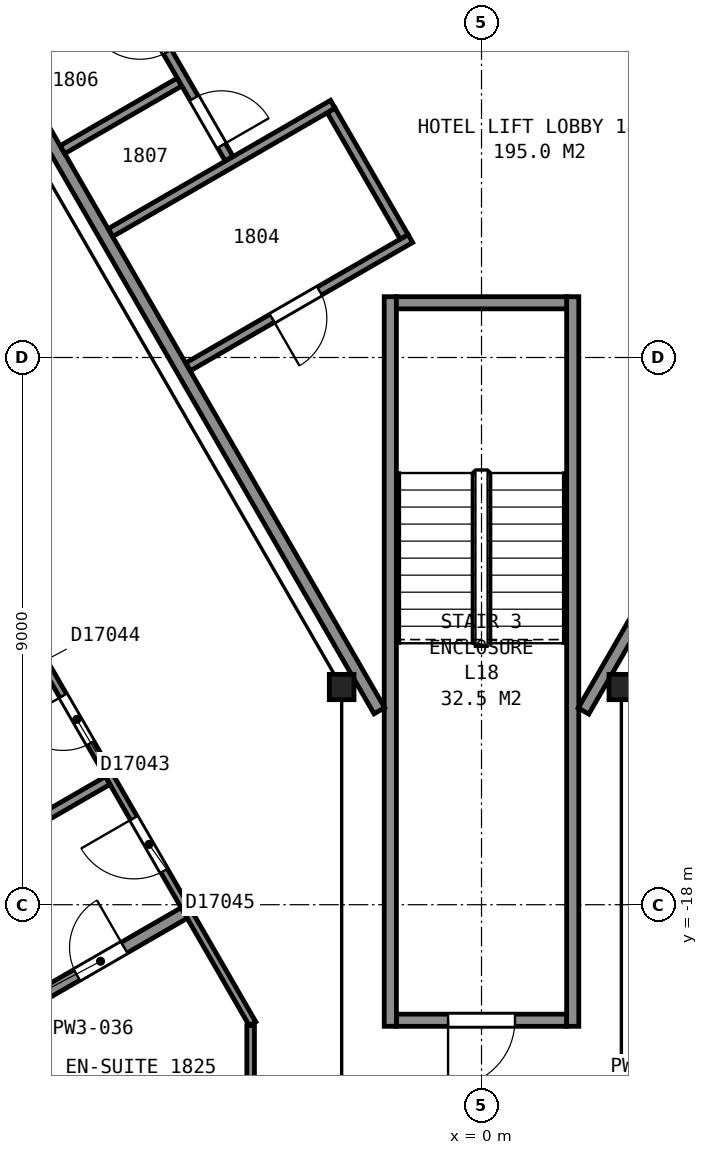
"""IFC4 building model, lengths in metres.
Left out: names, types, materials, properties, quantities, classifications, styles, units other than length and angle.
Written with IfcOpenShell. Run it as: python <this file> out.ifc"""

import sys

from ifc_helpers import new_model, si_unit, direction, frame, frame_2d, origin, origin_2d, place, context, subcontext, project, spatial, rectangle, i_section, extrude, element, fill, save


model = new_model("IFC4")
c1 = context("Model", 3, precision=1e-05, world=origin(), true_north=direction((0.0, 1.0)))
c2 = subcontext(c1, "Body", "Model", "MODEL_VIEW")
j1 = project(units=[si_unit("LENGTHUNIT", "METRE"), si_unit("PLANEANGLEUNIT", "RADIAN")], contexts=[c1])
p1 = place(None, origin())
s1 = spatial("IfcSite", under=j1, at=p1, CompositionType="ELEMENT")
p2 = place(p1, origin())
s2 = spatial("IfcBuilding", under=s1, at=p2, CompositionType="ELEMENT")
p3 = place(p2, frame((0.0, 0.0, 80.0)))
s3 = spatial("IfcBuildingStorey", under=s2, at=p3, CompositionType="ELEMENT", Elevation=80.0)
for number, where, z_axis, x_axis in (
    (1, (-2.3, -14.42, 0.0), (0.0, 0.0, 1.0), (1.0, 0.0, 0.0)),
    (2, (2.3, -14.42, 0.0), (0.0, 0.0, 1.0), (1.0, 0.0, 0.0)),
):
    element("IfcColumn", number, at=place(p3, frame(where, z_axis=z_axis, x_axis=x_axis)), inside=s3, PredefinedType="COLUMN", context=c2, shape_type="SweptSolid", body=[
        extrude(i_section(OverallWidth=0.406, OverallDepth=0.417, WebThickness=0.03, FlangeThickness=0.048, FilletRadius=0.015, at=origin_2d()), origin(), (0.0, 0.0, 1.0), 3.6),
    ])
p4 = place(p3, frame((-1.4, -19.9, 0.0), z_axis=(0.0, 0.0, 1.0), x_axis=(1.0, 0.0, 0.0)))
e3 = element("IfcWall", 3, at=p4, inside=s3, PredefinedType="PARTITIONING", context=c2, shape_type="SweptSolid", body=[
    extrude(rectangle(XDim=2.8, YDim=0.2, at=frame_2d((1.4, 0.0))), origin(), (0.0, 0.0, 1.0), 3.35),
])
p5 = place(p4, frame((0.85, 0.0, 0.0)))
e4 = element("IfcOpeningElement", 4, at=p5, cuts=e3, PredefinedType="OPENING", context=c2, shape_type="SweptSolid", body=[
    extrude(rectangle(XDim=1.1, YDim=2.1, at=frame_2d((0.55, 1.05))), frame((0.0, 0.11, 0.0), z_axis=(0.0, -1.0, 0.0), x_axis=(1.0, 0.0, 0.0)), (0.0, 0.0, 1.0), 0.22),
])
for number, where, z_axis, x_axis in (
    (5, (1.5, -8.0, 0.0), (0.0, 0.0, 1.0), (0.0, -1.0, 0.0)),
    (6, (-1.5, -8.0, 0.0), (0.0, 0.0, 1.0), (0.0, -1.0, 0.0)),
):
    element("IfcWall", number, at=place(p3, frame(where, z_axis=z_axis, x_axis=x_axis)), inside=s3, PredefinedType="PARTITIONING", context=c2, shape_type="SweptSolid", body=[
        extrude(rectangle(XDim=12.0, YDim=0.2, at=frame_2d((6.0, 0.0))), origin(), (0.0, 0.0, 1.0), 3.35),
    ])
p6 = place(p3, frame((-1.4, -8.1, 0.0), z_axis=(0.0, 0.0, 1.0), x_axis=(1.0, 0.0, 0.0)))
e7 = element("IfcWall", 7, at=p6, inside=s3, PredefinedType="PARTITIONING", context=c2, shape_type="SweptSolid", body=[
    extrude(rectangle(XDim=2.8, YDim=0.2, at=frame_2d((1.4, 0.0))), origin(), (0.0, 0.0, 1.0), 3.35),
])
p7 = place(p3, frame((-13.664, 5.946, 0.0), z_axis=(0.0, 0.0, 1.0), x_axis=(0.499994327219, -0.866028678941, 0.0)))
e8 = element("IfcWall", 8, at=p7, inside=s3, PredefinedType="PARTITIONING", context=c2, shape_type="SweptSolid", body=[
    extrude(rectangle(XDim=23.968, YDim=0.2, at=frame_2d((11.984, 0.0))), origin(), (0.0, 0.0, 1.0), 3.35),
])
p8 = place(p3, frame((-7.856, -3.912, 0.0), z_axis=(0.0, 0.0, 1.0), x_axis=(0.865971748, 0.500092923031, 0.0)))
e9 = element("IfcWall", 9, at=p8, inside=s3, PredefinedType="PARTITIONING", context=c2, shape_type="SweptSolid", body=[
    extrude(rectangle(XDim=2.225, YDim=0.15, at=frame_2d((1.112, 0.0))), origin(), (0.0, 0.0, 1.0), 3.35),
])
p9 = place(p3, frame((-6.892, -5.582, 0.0), z_axis=(0.0, 0.0, 1.0), x_axis=(0.865944298464, 0.500140452231, 0.0)))
e10 = element("IfcWall", 10, at=p9, inside=s3, PredefinedType="PARTITIONING", context=c2, shape_type="SweptSolid", body=[
    extrude(rectangle(XDim=2.224, YDim=0.15, at=frame_2d((1.112, 0.0))), origin(), (0.0, 0.0, 1.0), 3.35),
])
p10 = place(p3, frame((-6.1, -6.946, 0.0), z_axis=(0.0, 0.0, 1.0), x_axis=(0.866038200431, 0.499977834903, 0.0)))
e11 = element("IfcWall", 11, at=p10, inside=s3, PredefinedType="PARTITIONING", context=c2, shape_type="SweptSolid", body=[
    extrude(rectangle(XDim=4.22, YDim=0.15, at=frame_2d((2.11, 0.0))), origin(), (0.0, 0.0, 1.0), 3.35),
])
p11 = place(p3, frame((-4.152, -5.729, 0.0), z_axis=(0.0, 0.0, 1.0), x_axis=(-0.500024287448, 0.866011380966, 0.0)))
e12 = element("IfcWall", 12, at=p11, inside=s3, PredefinedType="PARTITIONING", context=c2, shape_type="SweptSolid", body=[
    extrude(rectangle(XDim=3.501, YDim=0.15, at=frame_2d((1.75, 0.0))), origin(), (0.0, 0.0, 1.0), 3.35),
])
p12 = place(p11, frame((2.026, 0.0, 0.0)))
e13 = element("IfcOpeningElement", 13, at=p12, cuts=e12, PredefinedType="OPENING", context=c2, shape_type="SweptSolid", body=[
    extrude(rectangle(XDim=0.9, YDim=2.1, at=frame_2d((0.45, 1.05))), frame((0.0, 0.085, 0.0), z_axis=(0.0, -1.0, 0.0), x_axis=(1.0, 0.0, 0.0)), (0.0, 0.0, 1.0), 0.17),
])
p13 = place(p11, frame((0.248, 0.0, 0.0)))
e14 = element("IfcOpeningElement", 14, at=p13, cuts=e12, PredefinedType="OPENING", context=c2, shape_type="SweptSolid", body=[
    extrude(rectangle(XDim=0.9, YDim=2.1, at=frame_2d((0.45, 1.05))), frame((0.0, 0.085, 0.0), z_axis=(0.0, -1.0, 0.0), x_axis=(1.0, 0.0, 0.0)), (0.0, 0.0, 1.0), 0.17),
])
p14 = place(p3, frame((-4.825, -9.154, 0.0), z_axis=(0.0, 0.0, 1.0), x_axis=(0.866023738697, 0.500002884005, 0.0)))
e15 = element("IfcWall", 15, at=p14, inside=s3, PredefinedType="PARTITIONING", context=c2, shape_type="SweptSolid", body=[
    extrude(rectangle(XDim=4.22, YDim=0.15, at=frame_2d((2.11, 0.0))), origin(), (0.0, 0.0, 1.0), 3.35),
])
p15 = place(p14, frame((1.595, 0.0, 0.0)))
e16 = element("IfcOpeningElement", 16, at=p15, cuts=e15, PredefinedType="OPENING", context=c2, shape_type="SweptSolid", body=[
    extrude(rectangle(XDim=0.9, YDim=2.1, at=frame_2d((0.45, 1.05))), frame((0.0, 0.085, 0.0), z_axis=(0.0, -1.0, 0.0), x_axis=(1.0, 0.0, 0.0)), (0.0, 0.0, 1.0), 0.17),
])
p16 = place(p3, frame((-2.472, -4.938, 0.0), z_axis=(0.0, 0.0, 1.0), x_axis=(0.500045362686, -0.865999212041, 0.0)))
e17 = element("IfcWall", 17, at=p16, inside=s3, PredefinedType="PARTITIONING", context=c2, shape_type="SweptSolid", body=[
    extrude(rectangle(XDim=2.4, YDim=0.15, at=frame_2d((1.2, 0.0))), origin(), (0.0, 0.0, 1.0), 3.35),
])
p17 = place(p3, frame((1.677, -14.815, 0.0), z_axis=(0.0, 0.0, 1.0), x_axis=(0.49999445743, 0.866028603765, 0.0)))
e18 = element("IfcWall", 18, at=p17, inside=s3, PredefinedType="PARTITIONING", context=c2, shape_type="SweptSolid", body=[
    extrude(rectangle(XDim=5.905, YDim=0.2, at=frame_2d((2.952, 0.0))), origin(), (0.0, 0.0, 1.0), 3.35),
])
p18 = place(p17, frame((3.855, 0.0, 0.0)))
e19 = element("IfcOpeningElement", 19, at=p18, cuts=e18, PredefinedType="OPENING", context=c2, shape_type="SweptSolid", body=[
    extrude(rectangle(XDim=1.8, YDim=2.1, at=frame_2d((0.9, 1.05))), frame((0.0, 0.11, 0.0), z_axis=(0.0, -1.0, 0.0), x_axis=(1.0, 0.0, 0.0)), (0.0, 0.0, 1.0), 0.22),
])
p19 = place(p3, frame((-3.766, -19.958, 0.0), z_axis=(0.0, 0.0, 1.0), x_axis=(-0.50002170027, 0.866012874765, 0.0)))
e20 = element("IfcWall", 20, at=p19, inside=s3, PredefinedType="PARTITIONING", context=c2, shape_type="SweptSolid", body=[
    extrude(rectangle(XDim=31.379, YDim=0.125, at=frame_2d((15.69, 0.0))), origin(), (0.0, 0.0, 1.0), 2.613),
])
p20 = place(p19, frame((25.28, 0.0, 0.0)))
e21 = element("IfcOpeningElement", 21, at=p20, cuts=e20, PredefinedType="OPENING", context=c2, shape_type="SweptSolid", body=[
    extrude(rectangle(XDim=1.5, YDim=2.1, at=frame_2d((0.75, 1.05))), frame((0.0, 0.073, 0.0), z_axis=(0.0, -1.0, 0.0), x_axis=(1.0, 0.0, 0.0)), (0.0, 0.0, 1.0), 0.145),
])
p21 = place(p19, frame((21.124, 0.0, 0.0)))
e22 = element("IfcOpeningElement", 22, at=p21, cuts=e20, PredefinedType="OPENING", context=c2, shape_type="SweptSolid", body=[
    extrude(rectangle(XDim=0.9, YDim=2.1, at=frame_2d((0.45, 1.05))), frame((0.0, 0.073, 0.0), z_axis=(0.0, -1.0, 0.0), x_axis=(1.0, 0.0, 0.0)), (0.0, 0.0, 1.0), 0.145),
])
p22 = place(p19, frame((14.349, 0.0, 0.0)))
e23 = element("IfcOpeningElement", 23, at=p22, cuts=e20, PredefinedType="OPENING", context=c2, shape_type="SweptSolid", body=[
    extrude(rectangle(XDim=0.9, YDim=2.1, at=frame_2d((0.45, 1.05))), frame((0.0, 0.073, 0.0), z_axis=(0.0, -1.0, 0.0), x_axis=(1.0, 0.0, 0.0)), (0.0, 0.0, 1.0), 0.145),
])
p23 = place(p19, frame((11.804, 0.0, 0.0)))
e24 = element("IfcOpeningElement", 24, at=p23, cuts=e20, PredefinedType="OPENING", context=c2, shape_type="SweptSolid", body=[
    extrude(rectangle(XDim=0.9, YDim=2.1, at=frame_2d((0.45, 1.05))), frame((0.0, 0.073, 0.0), z_axis=(0.0, -1.0, 0.0), x_axis=(1.0, 0.0, 0.0)), (0.0, 0.0, 1.0), 0.145),
])
p24 = place(p19, frame((5.33, 0.0, 0.0)))
e25 = element("IfcOpeningElement", 25, at=p24, cuts=e20, PredefinedType="OPENING", context=c2, shape_type="SweptSolid", body=[
    extrude(rectangle(XDim=0.9, YDim=2.1, at=frame_2d((0.45, 1.05))), frame((0.0, 0.073, 0.0), z_axis=(0.0, -1.0, 0.0), x_axis=(1.0, 0.0, 0.0)), (0.0, 0.0, 1.0), 0.145),
])
p25 = place(p19, frame((2.906, 0.0, 0.0)))
e26 = element("IfcOpeningElement", 26, at=p25, cuts=e20, PredefinedType="OPENING", context=c2, shape_type="SweptSolid", body=[
    extrude(rectangle(XDim=1.0, YDim=2.1, at=frame_2d((0.5, 1.05))), frame((0.0, 0.073, 0.0), z_axis=(0.0, -1.0, 0.0), x_axis=(1.0, 0.0, 0.0)), (0.0, 0.0, 1.0), 0.145),
])
p26 = place(p3, frame((-13.069, -19.953, 0.0), z_axis=(0.0, 0.0, 1.0), x_axis=(0.866021771655, 0.500006290979, 0.0)))
e27 = element("IfcWall", 27, at=p26, inside=s3, PredefinedType="PARTITIONING", context=c2, shape_type="SweptSolid", body=[
    extrude(rectangle(XDim=7.992, YDim=0.15, at=frame_2d((3.996, 0.0))), origin(), (0.0, 0.0, 1.0), 2.613),
])
p27 = place(p3, frame((-7.668, -19.877, 0.0), z_axis=(0.0, 0.0, 1.0), x_axis=(0.204611748063, -0.978843211426, 0.0)))
e28 = element("IfcWall", 28, at=p27, inside=s3, PredefinedType="PARTITIONING", context=c2, shape_type="SweptSolid", body=[
    extrude(rectangle(XDim=2.921, YDim=0.2, at=frame_2d((1.46, 0.0))), origin(), (0.0, 0.0, 1.0), 2.613),
])
p28 = place(p3, frame((-4.89, -18.136, 0.0), z_axis=(0.0, 0.0, 1.0), x_axis=(-0.866033317326, -0.499986293093, 0.0)))
e29 = element("IfcWall", 29, at=p28, inside=s3, PredefinedType="PARTITIONING", context=c2, shape_type="SweptSolid", body=[
    extrude(rectangle(XDim=3.337, YDim=0.2, at=frame_2d((1.669, 0.0))), origin(), (0.0, 0.0, 1.0), 2.613),
])
p29 = place(p28, frame((1.138, 0.0, 0.0)))
e30 = element("IfcOpeningElement", 30, at=p29, cuts=e29, PredefinedType="OPENING", context=c2, shape_type="SweptSolid", body=[
    extrude(rectangle(XDim=0.9, YDim=2.1, at=frame_2d((0.45, 1.05))), frame((0.0, 0.11, 0.0), z_axis=(0.0, -1.0, 0.0), x_axis=(1.0, 0.0, 0.0)), (0.0, 0.0, 1.0), 0.22),
])
p30 = place(p3, frame((-3.797, -22.86, 0.0), z_axis=(0.0, 0.0, 1.0), x_axis=(0.0, 1.0, 0.0)))
e31 = element("IfcWall", 31, at=p30, inside=s3, PredefinedType="PARTITIONING", context=c2, shape_type="SweptSolid", body=[
    extrude(rectangle(XDim=2.871, YDim=0.125, at=frame_2d((1.435, 0.0))), origin(), (0.0, 0.0, 1.0), 2.613),
])
p31 = place(p5, origin())
e32 = element("IfcDoor", 32, at=p31, inside=s3, OperationType="SINGLE_SWING_LEFT", PredefinedType="DOOR", context=c2, shape_type="SweptSolid", body=[
    extrude(rectangle(XDim=1.1, YDim=2.1, at=frame_2d((0.55, 1.05))), frame((0.0, 0.025, 0.0), z_axis=(0.0, -1.0, 0.0), x_axis=(1.0, 0.0, 0.0)), (0.0, 0.0, 1.0), 0.05),
])
fill(e4, e32)
p32 = place(p12, origin())
e33 = element("IfcDoor", 33, at=p32, inside=s3, OperationType="SINGLE_SWING_RIGHT", PredefinedType="DOOR", context=c2, shape_type="SweptSolid", body=[
    extrude(rectangle(XDim=0.9, YDim=2.1, at=frame_2d((0.45, 1.05))), frame((0.0, 0.025, 0.0), z_axis=(0.0, -1.0, 0.0), x_axis=(1.0, 0.0, 0.0)), (0.0, 0.0, 1.0), 0.05),
])
fill(e13, e33)
p33 = place(p13, origin())
e34 = element("IfcDoor", 34, at=p33, inside=s3, OperationType="SINGLE_SWING_LEFT", PredefinedType="DOOR", context=c2, shape_type="SweptSolid", body=[
    extrude(rectangle(XDim=0.9, YDim=2.1, at=frame_2d((0.45, 1.05))), frame((0.0, 0.025, 0.0), z_axis=(0.0, -1.0, 0.0), x_axis=(1.0, 0.0, 0.0)), (0.0, 0.0, 1.0), 0.05),
])
fill(e14, e34)
p34 = place(p15, origin())
e35 = element("IfcDoor", 35, at=p34, inside=s3, OperationType="SINGLE_SWING_LEFT", PredefinedType="DOOR", context=c2, shape_type="SweptSolid", body=[
    extrude(rectangle(XDim=0.9, YDim=2.1, at=frame_2d((0.45, 1.05))), frame((0.0, 0.025, 0.0), z_axis=(0.0, -1.0, 0.0), x_axis=(1.0, 0.0, 0.0)), (0.0, 0.0, 1.0), 0.05),
])
fill(e16, e35)
p35 = place(p24, origin())
e36 = element("IfcDoor", 36, at=p35, inside=s3, OperationType="SINGLE_SWING_RIGHT", PredefinedType="DOOR", context=c2, shape_type="SweptSolid", body=[
    extrude(rectangle(XDim=0.9, YDim=2.1, at=frame_2d((0.45, 1.05))), frame((0.0, 0.025, 0.0), z_axis=(0.0, -1.0, 0.0), x_axis=(1.0, 0.0, 0.0)), (0.0, 0.0, 1.0), 0.05),
])
fill(e25, e36)
p36 = place(p25, origin())
e37 = element("IfcDoor", 37, at=p36, inside=s3, OperationType="SINGLE_SWING_RIGHT", PredefinedType="DOOR", context=c2, shape_type="SweptSolid", body=[
    extrude(rectangle(XDim=1.0, YDim=2.1, at=frame_2d((0.5, 1.05))), frame((0.0, 0.025, 0.0), z_axis=(0.0, -1.0, 0.0), x_axis=(1.0, 0.0, 0.0)), (0.0, 0.0, 1.0), 0.05),
])
fill(e26, e37)
p37 = place(p29, origin())
e38 = element("IfcDoor", 38, at=p37, inside=s3, OperationType="SINGLE_SWING_LEFT", PredefinedType="DOOR", context=c2, shape_type="SweptSolid", body=[
    extrude(rectangle(XDim=0.9, YDim=2.1, at=frame_2d((0.45, 1.05))), frame((0.0, 0.025, 0.0), z_axis=(0.0, -1.0, 0.0), x_axis=(1.0, 0.0, 0.0)), (0.0, 0.0, 1.0), 0.05),
])
fill(e30, e38)
save(model, sys.argv[1])
